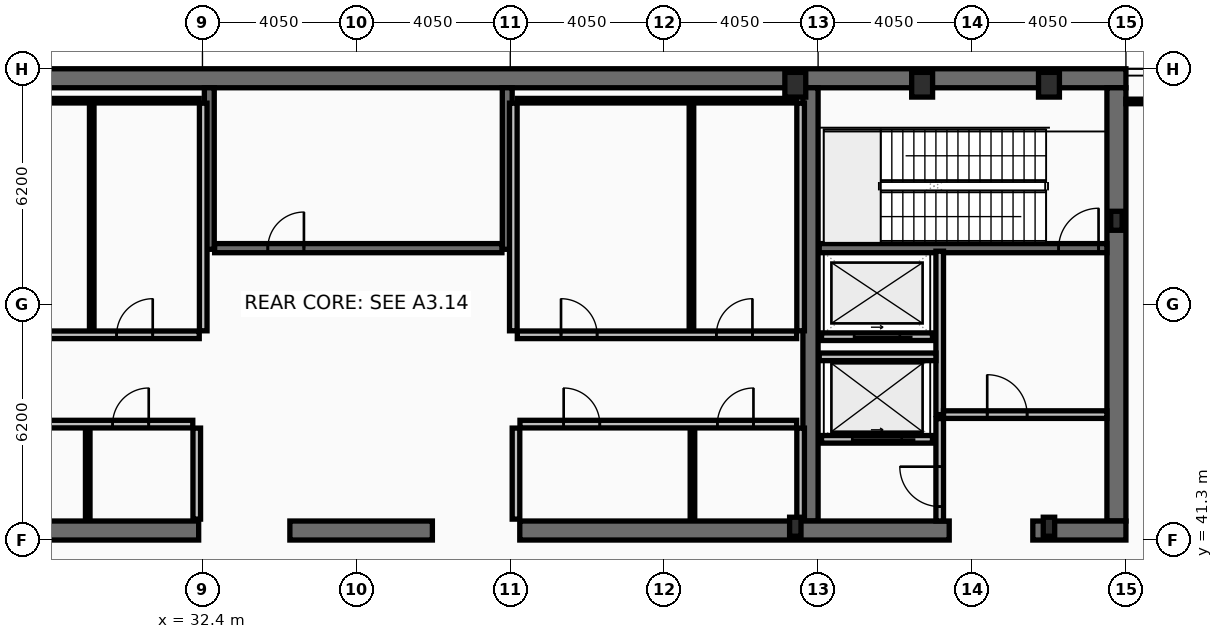
"""IFC4 building model, lengths in metres.
Left out: names, types, materials, properties, quantities, classifications, styles, units other than length and angle.
Written with IfcOpenShell. Run it as: python <this file> out.ifc"""

import sys

from ifc_helpers import new_model, si_unit, direction, frame, frame_2d, origin, origin_2d, place, context, subcontext, project, spatial, rectangle, hollow_rectangle, i_section, extrude, element, fill, save


model = new_model("IFC4")
c1 = context("Model", 3, precision=1e-05, world=origin(), true_north=direction((0.0, 1.0)))
c2 = subcontext(c1, "Body", "Model", "MODEL_VIEW")
j1 = project(units=[si_unit("LENGTHUNIT", "METRE"), si_unit("PLANEANGLEUNIT", "RADIAN")], contexts=[c1])
p1 = place(None, origin())
s1 = spatial("IfcSite", under=j1, at=p1, CompositionType="ELEMENT")
p2 = place(p1, origin())
s2 = spatial("IfcBuilding", under=s1, at=p2, CompositionType="ELEMENT")
p3 = place(p2, frame((0.0, 0.0, 356.2)))
s3 = spatial("IfcBuildingStorey", under=s2, at=p3, CompositionType="ELEMENT", Elevation=356.2)
p4 = place(p3, frame((16.2, 53.45, 0.0), z_axis=(0.0, 0.0, 1.0), x_axis=(1.0, 0.0, 0.0)))
e1 = element("IfcWall", 1, at=p4, inside=s3, PredefinedType="SHEAR", context=c2, shape_type="SweptSolid", body=[
    extrude(rectangle(XDim=40.5, YDim=0.5, at=frame_2d((20.25, 0.0))), origin(), (0.0, 0.0, 1.0), 5.4),
])
p5 = place(p3, frame((56.45, 53.2, 0.0), z_axis=(0.0, 0.0, 1.0), x_axis=(0.0, -1.0, 0.0)))
e2 = element("IfcWall", 2, at=p5, inside=s3, PredefinedType="SHEAR", context=c2, shape_type="SweptSolid", body=[
    extrude(rectangle(XDim=11.4, YDim=0.5, at=frame_2d((5.7, 0.0))), origin(), (0.0, 0.0, 1.0), 5.4),
])
p6 = place(p3, frame((48.4, 41.8, 0.0), z_axis=(0.0, 0.0, 1.0), x_axis=(0.0, 1.0, 0.0)))
e3 = element("IfcWall", 3, at=p6, inside=s3, PredefinedType="SHEAR", context=c2, shape_type="SweptSolid", body=[
    extrude(rectangle(XDim=11.4, YDim=0.4, at=frame_2d((5.7, 0.0))), origin(), (0.0, 0.0, 1.0), 5.4),
])
p7 = place(p3, frame((32.3, 41.55, 0.0), z_axis=(0.0, 0.0, 1.0), x_axis=(-1.0, 0.0, 0.0)))
e4 = element("IfcWall", 4, at=p7, inside=s3, PredefinedType="SHEAR", context=c2, shape_type="SweptSolid", body=[
    extrude(rectangle(XDim=11.45, YDim=0.5, at=frame_2d((5.725, 0.0))), origin(), (0.0, 0.0, 1.0), 5.4),
])
p8 = place(p3, frame((38.45, 41.55, 0.0), z_axis=(0.0, 0.0, 1.0), x_axis=(-1.0, 0.0, 0.0)))
e5 = element("IfcWall", 5, at=p8, inside=s3, PredefinedType="SHEAR", context=c2, shape_type="SweptSolid", body=[
    extrude(rectangle(XDim=3.75, YDim=0.5, at=frame_2d((1.875, 0.0))), origin(), (0.0, 0.0, 1.0), 5.4),
])
p9 = place(p3, frame((52.05, 41.55, 0.0), z_axis=(0.0, 0.0, 1.0), x_axis=(-1.0, 0.0, 0.0)))
e6 = element("IfcWall", 6, at=p9, inside=s3, PredefinedType="SHEAR", context=c2, shape_type="SweptSolid", body=[
    extrude(rectangle(XDim=11.3, YDim=0.5, at=frame_2d((5.65, 0.0))), origin(), (0.0, 0.0, 1.0), 5.4),
])
p10 = place(p3, frame((56.7, 41.55, 0.0), z_axis=(0.0, 0.0, 1.0), x_axis=(-1.0, 0.0, 0.0)))
e7 = element("IfcWall", 7, at=p10, inside=s3, PredefinedType="SHEAR", context=c2, shape_type="SweptSolid", body=[
    extrude(rectangle(XDim=2.45, YDim=0.5, at=frame_2d((1.225, 0.0))), origin(), (0.0, 0.0, 1.0), 5.4),
])
for number, where, z_axis, x_axis in (
    (8, (32.58, 48.95, 0.0), (0.0, 0.0, 1.0), (0.0, 1.0, 0.0)),
    (9, (40.42, 48.95, 0.0), (0.0, 0.0, 1.0), (0.0, 1.0, 0.0)),
):
    element("IfcWall", number, at=place(p3, frame(where, z_axis=z_axis, x_axis=x_axis)), inside=s3, PredefinedType="SHEAR", context=c2, shape_type="SweptSolid", body=[
        extrude(rectangle(XDim=4.25, YDim=0.26, at=frame_2d((2.125, 0.0))), origin(), (0.0, 0.0, 1.0), 5.4),
    ])
p11 = place(p3, frame((48.63, 48.98, 0.0), z_axis=(0.0, 0.0, 1.0), x_axis=(1.0, 0.0, 0.0)))
e10 = element("IfcWall", 10, at=p11, inside=s3, PredefinedType="SHEAR", context=c2, shape_type="SweptSolid", body=[
    extrude(rectangle(XDim=7.57, YDim=0.24, at=frame_2d((3.785, 0.0))), origin(), (0.0, 0.0, 1.0), 5.4),
])
p12 = place(p11, frame((6.3, 0.0, 0.0)))
e11 = element("IfcOpeningElement", 11, at=p12, cuts=e10, PredefinedType="OPENING", context=c2, shape_type="SweptSolid", body=[
    extrude(rectangle(XDim=1.05, YDim=2.15, at=frame_2d((0.525, 1.075))), frame((0.0, 0.13, 0.0), z_axis=(0.0, -1.0, 0.0), x_axis=(1.0, 0.0, 0.0)), (0.0, 0.0, 1.0), 0.26),
])
p13 = place(p3, frame((32.72, 48.98, 0.0), z_axis=(0.0, 0.0, 1.0), x_axis=(1.0, 0.0, 0.0)))
e12 = element("IfcWall", 12, at=p13, inside=s3, PredefinedType="SHEAR", context=c2, shape_type="SweptSolid", body=[
    extrude(rectangle(XDim=7.56, YDim=0.24, at=frame_2d((3.78, 0.0))), origin(), (0.0, 0.0, 1.0), 5.4),
])
p14 = place(p13, frame((1.4, 0.0, 0.0)))
e13 = element("IfcOpeningElement", 13, at=p14, cuts=e12, PredefinedType="OPENING", context=c2, shape_type="SweptSolid", body=[
    extrude(rectangle(XDim=0.95, YDim=2.1, at=frame_2d((0.475, 1.05))), frame((0.0, 0.13, 0.0), z_axis=(0.0, -1.0, 0.0), x_axis=(1.0, 0.0, 0.0)), (0.0, 0.0, 1.0), 0.26),
])
for number, where, z_axis, x_axis in (
    (14, (48.0, 53.28, 0.0), (0.0, 0.0, 1.0), (1.0, 0.0, 0.0)),
    (15, (51.337, 53.28, 0.0), (0.0, 0.0, 1.0), (1.0, 0.0, 0.0)),
    (16, (54.675, 53.28, 0.0), (0.0, 0.0, 1.0), (1.0, 0.0, 0.0)),
):
    element("IfcColumn", number, at=place(p3, frame(where, z_axis=z_axis, x_axis=x_axis)), inside=s3, PredefinedType="COLUMN", context=c2, shape_type="SweptSolid", body=[
        extrude(hollow_rectangle(XDim=0.55, YDim=0.65, WallThickness=0.04, at=origin_2d()), origin(), (0.0, 0.0, 1.0), 5.6),
    ])
for number, where, z_axis, x_axis in (
    (17, (56.45, 49.7, 0.0), (0.0, 0.0, 1.0), (1.0, 0.0, 0.0)),
    (18, (48.0, 41.65, 0.0), (0.0, 0.0, 1.0), (1.0, 0.0, 0.0)),
    (19, (54.675, 41.65, 0.0), (0.0, 0.0, 1.0), (1.0, 0.0, 0.0)),
):
    element("IfcColumn", number, at=place(p3, frame(where, z_axis=z_axis, x_axis=x_axis)), inside=s3, PredefinedType="COLUMN", context=c2, shape_type="SweptSolid", body=[
        extrude(i_section(OverallWidth=0.3, OverallDepth=0.5, WebThickness=0.014, FlangeThickness=0.028, at=origin_2d()), origin(), (0.0, 0.0, 1.0), 5.6),
    ])
p15 = place(p3, frame((51.61, 43.95, 0.0), z_axis=(0.0, 0.0, 1.0), x_axis=(-1.0, 0.0, 0.0)))
e20 = element("IfcWall", 20, at=p15, inside=s3, PredefinedType="PARTITIONING", context=c2, shape_type="SweptSolid", body=[
    extrude(rectangle(XDim=2.92, YDim=0.2, at=frame_2d((1.46, 0.0))), origin(), (0.0, 0.0, 1.0), 5.4),
])
p16 = place(p15, frame((0.81, 0.0, 0.0)))
e21 = element("IfcOpeningElement", 21, at=p16, cuts=e20, PredefinedType="OPENING", context=c2, shape_type="SweptSolid", body=[
    extrude(rectangle(XDim=1.3, YDim=2.18, at=frame_2d((0.65, 1.09))), frame((0.0, 0.11, 0.0), z_axis=(0.0, -1.0, 0.0), x_axis=(1.0, 0.0, 0.0)), (0.0, 0.0, 1.0), 0.22),
])
p17 = place(p3, frame((51.61, 46.65, 0.0), z_axis=(0.0, 0.0, 1.0), x_axis=(-1.0, 0.0, 0.0)))
e22 = element("IfcWall", 22, at=p17, inside=s3, PredefinedType="PARTITIONING", context=c2, shape_type="SweptSolid", body=[
    extrude(rectangle(XDim=2.92, YDim=0.2, at=frame_2d((1.46, 0.0))), origin(), (0.0, 0.0, 1.0), 5.4),
])
p18 = place(p17, frame((0.86, 0.0, 0.0)))
e23 = element("IfcOpeningElement", 23, at=p18, cuts=e22, PredefinedType="OPENING", context=c2, shape_type="SweptSolid", body=[
    extrude(rectangle(XDim=1.2, YDim=2.18, at=frame_2d((0.6, 1.09))), frame((0.0, 0.11, 0.0), z_axis=(0.0, -1.0, 0.0), x_axis=(1.0, 0.0, 0.0)), (0.0, 0.0, 1.0), 0.22),
])
p19 = place(p3, frame((51.8, 44.6, 0.0), z_axis=(0.0, 0.0, 1.0), x_axis=(0.0, 1.0, 0.0)))
e24 = element("IfcWall", 24, at=p19, inside=s3, PredefinedType="PARTITIONING", context=c2, shape_type="SweptSolid", body=[
    extrude(rectangle(XDim=4.3, YDim=0.2, at=frame_2d((2.15, 0.0))), origin(), (0.0, 0.0, 1.0), 5.4),
])
p20 = place(p3, frame((51.9, 44.6, 0.0), z_axis=(0.0, 0.0, 1.0), x_axis=(1.0, 0.0, 0.0)))
e25 = element("IfcWall", 25, at=p20, inside=s3, PredefinedType="PARTITIONING", context=c2, shape_type="SweptSolid", body=[
    extrude(rectangle(XDim=4.3, YDim=0.2, at=frame_2d((2.15, 0.0))), origin(), (0.0, 0.0, 1.0), 5.4),
])
p21 = place(p20, frame((1.15, 0.0, 0.0)))
e26 = element("IfcOpeningElement", 26, at=p21, cuts=e25, PredefinedType="OPENING", context=c2, shape_type="SweptSolid", body=[
    extrude(rectangle(XDim=1.05, YDim=2.15, at=frame_2d((0.525, 1.075))), frame((0.0, 0.11, 0.0), z_axis=(0.0, -1.0, 0.0), x_axis=(1.0, 0.0, 0.0)), (0.0, 0.0, 1.0), 0.22),
])
p22 = place(p3, frame((48.63, 46.12, 0.0), z_axis=(0.0, 0.0, 1.0), x_axis=(1.0, 0.0, 0.0)))
e27 = element("IfcWall", 27, at=p22, inside=s3, PredefinedType="PARTITIONING", context=c2, shape_type="SweptSolid", body=[
    extrude(rectangle(XDim=3.07, YDim=0.2, at=frame_2d((1.535, 0.0))), origin(), (0.0, 0.0, 1.0), 5.4),
])
p23 = place(p3, frame((51.8, 41.8, 0.0), z_axis=(0.0, 0.0, 1.0), x_axis=(0.0, 1.0, 0.0)))
e28 = element("IfcWall", 28, at=p23, inside=s3, PredefinedType="PARTITIONING", context=c2, shape_type="SweptSolid", body=[
    extrude(rectangle(XDim=2.695, YDim=0.2, at=frame_2d((1.348, 0.0))), origin(), (0.0, 0.0, 1.0), 5.4),
])
p24 = place(p23, frame((0.38, 0.0, 0.0)))
e29 = element("IfcOpeningElement", 29, at=p24, cuts=e28, PredefinedType="OPENING", context=c2, shape_type="SweptSolid", body=[
    extrude(rectangle(XDim=1.05, YDim=2.15, at=frame_2d((0.525, 1.075))), frame((0.0, 0.11, 0.0), z_axis=(0.0, -1.0, 0.0), x_axis=(1.0, 0.0, 0.0)), (0.0, 0.0, 1.0), 0.22),
])
p25 = place(p3, frame((32.42, 46.805, 0.0), z_axis=(0.0, 0.0, 1.0), x_axis=(0.0, 1.0, 0.0)))
e30 = element("IfcWall", 30, at=p25, inside=s3, PredefinedType="PARTITIONING", context=c2, shape_type="SweptSolid", body=[
    extrude(rectangle(XDim=5.99, YDim=0.2, at=frame_2d((2.995, 0.0))), origin(), (0.0, 0.0, 1.0), 5.4),
])
p26 = place(p3, frame((24.805, 52.86, 0.0), z_axis=(0.0, 0.0, 1.0), x_axis=(1.0, 0.0, 0.0)))
e31 = element("IfcWall", 31, at=p26, inside=s3, PredefinedType="PARTITIONING", context=c2, shape_type="SweptSolid", body=[
    extrude(rectangle(XDim=7.51, YDim=0.12, at=frame_2d((3.755, 0.0))), origin(), (0.0, 0.0, 1.0), 5.4),
])
p27 = place(p3, frame((29.486, 46.805, 0.0), z_axis=(0.0, 0.0, 1.0), x_axis=(0.0, 1.0, 0.0)))
e32 = element("IfcWall", 32, at=p27, inside=s3, PredefinedType="PARTITIONING", context=c2, shape_type="SweptSolid", body=[
    extrude(rectangle(XDim=5.99, YDim=0.12, at=frame_2d((2.995, 0.0))), origin(), (0.0, 0.0, 1.0), 5.4),
])
p28 = place(p3, frame((24.805, 46.7, 0.0), z_axis=(0.0, 0.0, 1.0), x_axis=(1.0, 0.0, 0.0)))
e33 = element("IfcWall", 33, at=p28, inside=s3, PredefinedType="PARTITIONING", context=c2, shape_type="SweptSolid", body=[
    extrude(rectangle(XDim=7.51, YDim=0.2, at=frame_2d((3.755, 0.0))), origin(), (0.0, 0.0, 1.0), 5.4),
])
p29 = place(p28, frame((1.15, 0.0, 0.0)))
e34 = element("IfcOpeningElement", 34, at=p29, cuts=e33, PredefinedType="OPENING", context=c2, shape_type="SweptSolid", body=[
    extrude(rectangle(XDim=0.95, YDim=2.1, at=frame_2d((0.475, 1.05))), frame((0.0, 0.11, 0.0), z_axis=(0.0, -1.0, 0.0), x_axis=(1.0, 0.0, 0.0)), (0.0, 0.0, 1.0), 0.22),
])
p30 = place(p28, frame((5.336, 0.0, 0.0)))
e35 = element("IfcOpeningElement", 35, at=p30, cuts=e33, PredefinedType="OPENING", context=c2, shape_type="SweptSolid", body=[
    extrude(rectangle(XDim=0.95, YDim=2.1, at=frame_2d((0.475, 1.05))), frame((0.0, 0.11, 0.0), z_axis=(0.0, -1.0, 0.0), x_axis=(1.0, 0.0, 0.0)), (0.0, 0.0, 1.0), 0.22),
])
p31 = place(p3, frame((32.25, 41.85, 0.0), z_axis=(0.0, 0.0, 1.0), x_axis=(0.0, 1.0, 0.0)))
e36 = element("IfcWall", 36, at=p31, inside=s3, PredefinedType="PARTITIONING", context=c2, shape_type="SweptSolid", body=[
    extrude(rectangle(XDim=2.395, YDim=0.2, at=frame_2d((1.198, 0.0))), origin(), (0.0, 0.0, 1.0), 5.4),
])
p32 = place(p3, frame((29.381, 41.85, 0.0), z_axis=(0.0, 0.0, 1.0), x_axis=(0.0, 1.0, 0.0)))
e37 = element("IfcWall", 37, at=p32, inside=s3, PredefinedType="PARTITIONING", context=c2, shape_type="SweptSolid", body=[
    extrude(rectangle(XDim=2.395, YDim=0.12, at=frame_2d((1.198, 0.0))), origin(), (0.0, 0.0, 1.0), 5.4),
])
p33 = place(p3, frame((24.805, 44.35, 0.0), z_axis=(0.0, 0.0, 1.0), x_axis=(1.0, 0.0, 0.0)))
e38 = element("IfcWall", 38, at=p33, inside=s3, PredefinedType="PARTITIONING", context=c2, shape_type="SweptSolid", body=[
    extrude(rectangle(XDim=7.34, YDim=0.2, at=frame_2d((3.67, 0.0))), origin(), (0.0, 0.0, 1.0), 5.4),
])
p34 = place(p33, frame((1.15, 0.0, 0.0)))
e39 = element("IfcOpeningElement", 39, at=p34, cuts=e38, PredefinedType="OPENING", context=c2, shape_type="SweptSolid", body=[
    extrude(rectangle(XDim=0.95, YDim=2.1, at=frame_2d((0.475, 1.05))), frame((0.0, 0.11, 0.0), z_axis=(0.0, -1.0, 0.0), x_axis=(1.0, 0.0, 0.0)), (0.0, 0.0, 1.0), 0.22),
])
p35 = place(p33, frame((5.231, 0.0, 0.0)))
e40 = element("IfcOpeningElement", 40, at=p35, cuts=e38, PredefinedType="OPENING", context=c2, shape_type="SweptSolid", body=[
    extrude(rectangle(XDim=0.95, YDim=2.1, at=frame_2d((0.475, 1.05))), frame((0.0, 0.11, 0.0), z_axis=(0.0, -1.0, 0.0), x_axis=(1.0, 0.0, 0.0)), (0.0, 0.0, 1.0), 0.22),
])
for number, where, z_axis, x_axis in (
    (41, (40.58, 46.805, 0.0), (0.0, 0.0, 1.0), (0.0, 1.0, 0.0)),
    (42, (48.14, 46.805, 0.0), (0.0, 0.0, 1.0), (0.0, 1.0, 0.0)),
):
    element("IfcWall", number, at=place(p3, frame(where, z_axis=z_axis, x_axis=x_axis)), inside=s3, PredefinedType="PARTITIONING", context=c2, shape_type="SweptSolid", body=[
        extrude(rectangle(XDim=5.99, YDim=0.2, at=frame_2d((2.995, 0.0))), origin(), (0.0, 0.0, 1.0), 5.4),
    ])
p36 = place(p3, frame((40.685, 52.86, 0.0), z_axis=(0.0, 0.0, 1.0), x_axis=(1.0, 0.0, 0.0)))
e43 = element("IfcWall", 43, at=p36, inside=s3, PredefinedType="PARTITIONING", context=c2, shape_type="SweptSolid", body=[
    extrude(rectangle(XDim=7.35, YDim=0.12, at=frame_2d((3.675, 0.0))), origin(), (0.0, 0.0, 1.0), 5.4),
])
p37 = place(p3, frame((45.267, 46.805, 0.0), z_axis=(0.0, 0.0, 1.0), x_axis=(0.0, 1.0, 0.0)))
e44 = element("IfcWall", 44, at=p37, inside=s3, PredefinedType="PARTITIONING", context=c2, shape_type="SweptSolid", body=[
    extrude(rectangle(XDim=5.99, YDim=0.12, at=frame_2d((2.995, 0.0))), origin(), (0.0, 0.0, 1.0), 5.4),
])
p38 = place(p3, frame((40.685, 46.7, 0.0), z_axis=(0.0, 0.0, 1.0), x_axis=(1.0, 0.0, 0.0)))
e45 = element("IfcWall", 45, at=p38, inside=s3, PredefinedType="PARTITIONING", context=c2, shape_type="SweptSolid", body=[
    extrude(rectangle(XDim=7.35, YDim=0.2, at=frame_2d((3.675, 0.0))), origin(), (0.0, 0.0, 1.0), 5.4),
])
p39 = place(p38, frame((1.15, 0.0, 0.0)))
e46 = element("IfcOpeningElement", 46, at=p39, cuts=e45, PredefinedType="OPENING", context=c2, shape_type="SweptSolid", body=[
    extrude(rectangle(XDim=0.95, YDim=2.1, at=frame_2d((0.475, 1.05))), frame((0.0, 0.11, 0.0), z_axis=(0.0, -1.0, 0.0), x_axis=(1.0, 0.0, 0.0)), (0.0, 0.0, 1.0), 0.22),
])
p40 = place(p38, frame((5.237, 0.0, 0.0)))
e47 = element("IfcOpeningElement", 47, at=p40, cuts=e45, PredefinedType="OPENING", context=c2, shape_type="SweptSolid", body=[
    extrude(rectangle(XDim=0.95, YDim=2.1, at=frame_2d((0.475, 1.05))), frame((0.0, 0.11, 0.0), z_axis=(0.0, -1.0, 0.0), x_axis=(1.0, 0.0, 0.0)), (0.0, 0.0, 1.0), 0.22),
])
for number, where, z_axis, x_axis in (
    (48, (40.65, 41.85, 0.0), (0.0, 0.0, 1.0), (0.0, 1.0, 0.0)),
    (49, (48.14, 41.85, 0.0), (0.0, 0.0, 1.0), (0.0, 1.0, 0.0)),
):
    element("IfcWall", number, at=place(p3, frame(where, z_axis=z_axis, x_axis=x_axis)), inside=s3, PredefinedType="PARTITIONING", context=c2, shape_type="SweptSolid", body=[
        extrude(rectangle(XDim=2.395, YDim=0.2, at=frame_2d((1.198, 0.0))), origin(), (0.0, 0.0, 1.0), 5.4),
    ])
p41 = place(p3, frame((45.294, 41.85, 0.0), z_axis=(0.0, 0.0, 1.0), x_axis=(0.0, 1.0, 0.0)))
e50 = element("IfcWall", 50, at=p41, inside=s3, PredefinedType="PARTITIONING", context=c2, shape_type="SweptSolid", body=[
    extrude(rectangle(XDim=2.395, YDim=0.12, at=frame_2d((1.198, 0.0))), origin(), (0.0, 0.0, 1.0), 5.4),
])
p42 = place(p3, frame((40.755, 44.35, 0.0), z_axis=(0.0, 0.0, 1.0), x_axis=(1.0, 0.0, 0.0)))
e51 = element("IfcWall", 51, at=p42, inside=s3, PredefinedType="PARTITIONING", context=c2, shape_type="SweptSolid", body=[
    extrude(rectangle(XDim=7.28, YDim=0.2, at=frame_2d((3.64, 0.0))), origin(), (0.0, 0.0, 1.0), 5.4),
])
p43 = place(p42, frame((1.15, 0.0, 0.0)))
e52 = element("IfcOpeningElement", 52, at=p43, cuts=e51, PredefinedType="OPENING", context=c2, shape_type="SweptSolid", body=[
    extrude(rectangle(XDim=0.95, YDim=2.1, at=frame_2d((0.475, 1.05))), frame((0.0, 0.11, 0.0), z_axis=(0.0, -1.0, 0.0), x_axis=(1.0, 0.0, 0.0)), (0.0, 0.0, 1.0), 0.22),
])
p44 = place(p42, frame((5.194, 0.0, 0.0)))
e53 = element("IfcOpeningElement", 53, at=p44, cuts=e51, PredefinedType="OPENING", context=c2, shape_type="SweptSolid", body=[
    extrude(rectangle(XDim=0.95, YDim=2.1, at=frame_2d((0.475, 1.05))), frame((0.0, 0.11, 0.0), z_axis=(0.0, -1.0, 0.0), x_axis=(1.0, 0.0, 0.0)), (0.0, 0.0, 1.0), 0.22),
])
p45 = place(p3, frame((56.7, 52.84, 0.0), z_axis=(0.0, 0.0, 1.0), x_axis=(1.0, 0.0, 0.0)))
e54 = element("IfcWall", 54, at=p45, inside=s3, PredefinedType="PARTITIONING", context=c2, shape_type="SweptSolid", body=[
    extrude(rectangle(XDim=4.105, YDim=0.12, at=frame_2d((2.052, 0.0))), origin(), (0.0, 0.0, 1.0), 5.4),
])
p46 = place(p12, origin())
e55 = element("IfcDoor", 55, at=p46, inside=s3, OperationType="SINGLE_SWING_RIGHT", PredefinedType="DOOR", context=c2, shape_type="SweptSolid", body=[
    extrude(rectangle(XDim=1.05, YDim=2.15, at=frame_2d((0.525, 1.075))), frame((0.0, 0.025, 0.0), z_axis=(0.0, -1.0, 0.0), x_axis=(1.0, 0.0, 0.0)), (0.0, 0.0, 1.0), 0.05),
])
fill(e11, e55)
p47 = place(p14, origin())
e56 = element("IfcDoor", 56, at=p47, inside=s3, OperationType="SINGLE_SWING_RIGHT", PredefinedType="DOOR", context=c2, shape_type="SweptSolid", body=[
    extrude(rectangle(XDim=0.95, YDim=2.1, at=frame_2d((0.475, 1.05))), frame((0.0, 0.025, 0.0), z_axis=(0.0, -1.0, 0.0), x_axis=(1.0, 0.0, 0.0)), (0.0, 0.0, 1.0), 0.05),
])
fill(e13, e56)
p48 = place(p16, origin())
e57 = element("IfcDoor", 57, at=p48, inside=s3, OperationType="SLIDING_TO_LEFT", PredefinedType="DOOR", context=c2, shape_type="SweptSolid", body=[
    extrude(rectangle(XDim=1.3, YDim=2.18, at=frame_2d((0.65, 1.09))), frame((0.0, 0.025, 0.0), z_axis=(0.0, -1.0, 0.0), x_axis=(1.0, 0.0, 0.0)), (0.0, 0.0, 1.0), 0.05),
])
fill(e21, e57)
p49 = place(p18, origin())
e58 = element("IfcDoor", 58, at=p49, inside=s3, OperationType="SLIDING_TO_LEFT", PredefinedType="DOOR", context=c2, shape_type="SweptSolid", body=[
    extrude(rectangle(XDim=1.2, YDim=2.18, at=frame_2d((0.6, 1.09))), frame((0.0, 0.025, 0.0), z_axis=(0.0, -1.0, 0.0), x_axis=(1.0, 0.0, 0.0)), (0.0, 0.0, 1.0), 0.05),
])
fill(e23, e58)
p50 = place(p21, origin())
e59 = element("IfcDoor", 59, at=p50, inside=s3, OperationType="SINGLE_SWING_LEFT", PredefinedType="DOOR", context=c2, shape_type="SweptSolid", body=[
    extrude(rectangle(XDim=1.05, YDim=2.15, at=frame_2d((0.525, 1.075))), frame((0.0, 0.025, 0.0), z_axis=(0.0, -1.0, 0.0), x_axis=(1.0, 0.0, 0.0)), (0.0, 0.0, 1.0), 0.05),
])
fill(e26, e59)
p51 = place(p24, origin())
e60 = element("IfcDoor", 60, at=p51, inside=s3, OperationType="SINGLE_SWING_RIGHT", PredefinedType="DOOR", context=c2, shape_type="SweptSolid", body=[
    extrude(rectangle(XDim=1.05, YDim=2.15, at=frame_2d((0.525, 1.075))), frame((0.0, 0.025, 0.0), z_axis=(0.0, -1.0, 0.0), x_axis=(1.0, 0.0, 0.0)), (0.0, 0.0, 1.0), 0.05),
])
fill(e29, e60)
p52 = place(p30, origin())
e61 = element("IfcDoor", 61, at=p52, inside=s3, OperationType="SINGLE_SWING_RIGHT", PredefinedType="DOOR", context=c2, shape_type="SweptSolid", body=[
    extrude(rectangle(XDim=0.95, YDim=2.1, at=frame_2d((0.475, 1.05))), frame((0.0, 0.025, 0.0), z_axis=(0.0, -1.0, 0.0), x_axis=(1.0, 0.0, 0.0)), (0.0, 0.0, 1.0), 0.05),
])
fill(e35, e61)
p53 = place(p35, origin())
e62 = element("IfcDoor", 62, at=p53, inside=s3, OperationType="SINGLE_SWING_RIGHT", PredefinedType="DOOR", context=c2, shape_type="SweptSolid", body=[
    extrude(rectangle(XDim=0.95, YDim=2.1, at=frame_2d((0.475, 1.05))), frame((0.0, 0.025, 0.0), z_axis=(0.0, -1.0, 0.0), x_axis=(1.0, 0.0, 0.0)), (0.0, 0.0, 1.0), 0.05),
])
fill(e40, e62)
p54 = place(p39, origin())
e63 = element("IfcDoor", 63, at=p54, inside=s3, OperationType="SINGLE_SWING_LEFT", PredefinedType="DOOR", context=c2, shape_type="SweptSolid", body=[
    extrude(rectangle(XDim=0.95, YDim=2.1, at=frame_2d((0.475, 1.05))), frame((0.0, 0.025, 0.0), z_axis=(0.0, -1.0, 0.0), x_axis=(1.0, 0.0, 0.0)), (0.0, 0.0, 1.0), 0.05),
])
fill(e46, e63)
p55 = place(p40, origin())
e64 = element("IfcDoor", 64, at=p55, inside=s3, OperationType="SINGLE_SWING_RIGHT", PredefinedType="DOOR", context=c2, shape_type="SweptSolid", body=[
    extrude(rectangle(XDim=0.95, YDim=2.1, at=frame_2d((0.475, 1.05))), frame((0.0, 0.025, 0.0), z_axis=(0.0, -1.0, 0.0), x_axis=(1.0, 0.0, 0.0)), (0.0, 0.0, 1.0), 0.05),
])
fill(e47, e64)
p56 = place(p43, origin())
e65 = element("IfcDoor", 65, at=p56, inside=s3, OperationType="SINGLE_SWING_LEFT", PredefinedType="DOOR", context=c2, shape_type="SweptSolid", body=[
    extrude(rectangle(XDim=0.95, YDim=2.1, at=frame_2d((0.475, 1.05))), frame((0.0, 0.025, 0.0), z_axis=(0.0, -1.0, 0.0), x_axis=(1.0, 0.0, 0.0)), (0.0, 0.0, 1.0), 0.05),
])
fill(e52, e65)
p57 = place(p44, origin())
e66 = element("IfcDoor", 66, at=p57, inside=s3, OperationType="SINGLE_SWING_RIGHT", PredefinedType="DOOR", context=c2, shape_type="SweptSolid", body=[
    extrude(rectangle(XDim=0.95, YDim=2.1, at=frame_2d((0.475, 1.05))), frame((0.0, 0.025, 0.0), z_axis=(0.0, -1.0, 0.0), x_axis=(1.0, 0.0, 0.0)), (0.0, 0.0, 1.0), 0.05),
])
fill(e53, e66)
save(model, sys.argv[1])
